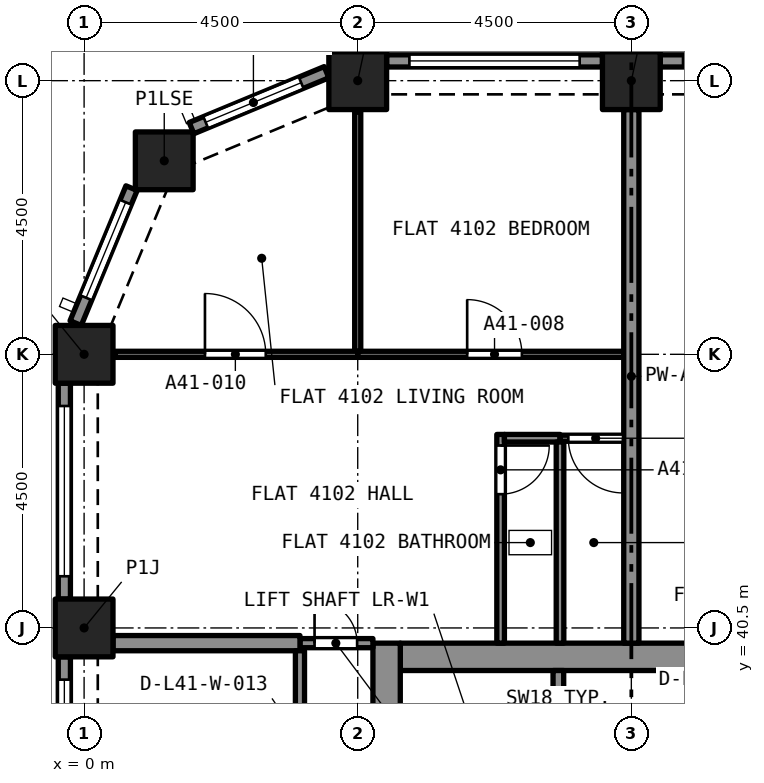
"""IFC4 building model, lengths in metres.
Left out: names, types, materials, properties, quantities, classifications, styles, units other than length and angle.
Written with IfcOpenShell. Run it as: python <this file> out.ifc"""

import sys

from ifc_helpers import new_model, si_unit, direction, frame, frame_2d, origin, origin_2d, place, context, subcontext, project, spatial, rectangle, extrude, element, fill, save


model = new_model("IFC4")
c1 = context("Model", 3, precision=1e-05, world=origin(), true_north=direction((0.0, 1.0)))
c2 = subcontext(c1, "Body", "Model", "MODEL_VIEW")
j1 = project(units=[si_unit("LENGTHUNIT", "METRE"), si_unit("PLANEANGLEUNIT", "RADIAN")], contexts=[c1])
p1 = place(None, origin())
s1 = spatial("IfcSite", under=j1, at=p1, CompositionType="ELEMENT")
p2 = place(p1, origin())
s2 = spatial("IfcBuilding", under=s1, at=p2, CompositionType="ELEMENT")
p3 = place(p2, frame((0.0, 0.0, 146.2)))
s3 = spatial("IfcBuildingStorey", under=s2, at=p3, CompositionType="ELEMENT", Elevation=146.2)
for number, where, z_axis, x_axis in (
    (1, (0.0, 40.5, 0.0), (0.0, 0.0, 1.0), (1.0, 0.0, 0.0)),
    (2, (0.0, 45.0, 0.0), (0.0, 0.0, 1.0), (1.0, 0.0, 0.0)),
    (3, (1.318, 48.182, 0.0), (0.0, 0.0, 1.0), (1.0, 0.0, 0.0)),
    (4, (4.5, 49.5, 0.0), (0.0, 0.0, 1.0), (1.0, 0.0, 0.0)),
    (5, (9.0, 49.5, 0.0), (0.0, 0.0, 1.0), (1.0, 0.0, 0.0)),
):
    element("IfcColumn", number, at=place(p3, frame(where, z_axis=z_axis, x_axis=x_axis)), inside=s3, PredefinedType="COLUMN", context=c2, shape_type="SweptSolid", body=[
        extrude(rectangle(XDim=0.95, YDim=0.95, at=origin_2d()), origin(), (0.0, 0.0, 1.0), 4.4),
    ])
p4 = place(p3, frame((5.2, 40.025, 0.0), z_axis=(0.0, 0.0, 1.0), x_axis=(1.0, 0.0, 0.0)))
e6 = element("IfcWall", 6, at=p4, inside=s3, PredefinedType="SOLIDWALL", context=c2, shape_type="SweptSolid", body=[
    extrude(rectangle(XDim=7.6, YDim=0.45, at=frame_2d((3.8, 0.0))), origin(), (0.0, 0.0, 1.0), 4.4),
])
p5 = place(p3, frame((4.975, 27.25, 0.0), z_axis=(0.0, 0.0, 1.0), x_axis=(0.0, 1.0, 0.0)))
e7 = element("IfcWall", 7, at=p5, inside=s3, PredefinedType="SOLIDWALL", context=c2, shape_type="SweptSolid", body=[
    extrude(rectangle(XDim=13.0, YDim=0.45, at=frame_2d((6.5, 0.0))), origin(), (0.0, 0.0, 1.0), 4.4),
])
p6 = place(p5, frame((8.7, 0.0, 0.0)))
e8 = element("IfcOpeningElement", 8, at=p6, cuts=e7, PredefinedType="OPENING", context=c2, shape_type="SweptSolid", body=[
    extrude(rectangle(XDim=1.2, YDim=2.1, at=frame_2d((0.6, 1.05))), frame((0.0, 0.235, 0.0), z_axis=(0.0, -1.0, 0.0), x_axis=(1.0, 0.0, 0.0)), (0.0, 0.0, 1.0), 0.47),
])
p7 = place(p3, frame((9.475, 49.825, 0.0), z_axis=(0.0, 0.0, 1.0), x_axis=(1.0, 0.0, 0.0)))
e9 = element("IfcWall", 9, at=p7, inside=s3, PredefinedType="SOLIDWALL", context=c2, shape_type="SweptSolid", body=[
    extrude(rectangle(XDim=3.55, YDim=0.2, at=frame_2d((1.775, 0.0))), origin(), (0.0, 0.0, 1.0), 4.4),
])
p8 = place(p7, frame((0.375, 0.0, 0.45)))
e10 = element("IfcOpeningElement", 10, at=p8, cuts=e9, PredefinedType="OPENING", context=c2, shape_type="SweptSolid", body=[
    extrude(rectangle(XDim=2.8, YDim=2.55, at=frame_2d((1.4, 1.275))), frame((0.0, 0.11, 0.0), z_axis=(0.0, -1.0, 0.0), x_axis=(1.0, 0.0, 0.0)), (0.0, 0.0, 1.0), 0.22),
])
p9 = place(p3, frame((4.975, 49.825, 0.0), z_axis=(0.0, 0.0, 1.0), x_axis=(1.0, 0.0, 0.0)))
e11 = element("IfcWall", 11, at=p9, inside=s3, PredefinedType="SOLIDWALL", context=c2, shape_type="SweptSolid", body=[
    extrude(rectangle(XDim=3.55, YDim=0.2, at=frame_2d((1.775, 0.0))), origin(), (0.0, 0.0, 1.0), 4.4),
])
p10 = place(p9, frame((0.375, 0.0, 0.45)))
e12 = element("IfcOpeningElement", 12, at=p10, cuts=e11, PredefinedType="OPENING", context=c2, shape_type="SweptSolid", body=[
    extrude(rectangle(XDim=2.8, YDim=2.55, at=frame_2d((1.4, 1.275))), frame((0.0, 0.11, 0.0), z_axis=(0.0, -1.0, 0.0), x_axis=(1.0, 0.0, 0.0)), (0.0, 0.0, 1.0), 0.22),
])
p11 = place(p3, frame((1.767, 48.72, 0.0), z_axis=(0.0, 0.0, 1.0), x_axis=(0.923880599843, 0.382680855588, 0.0)))
e13 = element("IfcWall", 13, at=p11, inside=s3, PredefinedType="SOLIDWALL", context=c2, shape_type="SweptSolid", body=[
    extrude(rectangle(XDim=2.403, YDim=0.2, at=frame_2d((1.201, 0.0))), origin(), (0.0, 0.0, 1.0), 4.4),
])
p12 = place(p11, frame((0.251, 0.0, 0.45)))
e14 = element("IfcOpeningElement", 14, at=p12, cuts=e13, PredefinedType="OPENING", context=c2, shape_type="SweptSolid", body=[
    extrude(rectangle(XDim=1.7, YDim=2.55, at=frame_2d((0.85, 1.275))), frame((0.0, 0.11, 0.0), z_axis=(0.0, -1.0, 0.0), x_axis=(1.0, 0.0, 0.0)), (0.0, 0.0, 1.0), 0.22),
])
p13 = place(p3, frame((-0.139, 45.513, 0.0), z_axis=(0.0, 0.0, 1.0), x_axis=(0.382680855588, 0.923880599843, 0.0)))
e15 = element("IfcWall", 15, at=p13, inside=s3, PredefinedType="SOLIDWALL", context=c2, shape_type="SweptSolid", body=[
    extrude(rectangle(XDim=2.403, YDim=0.2, at=frame_2d((1.201, 0.0))), origin(), (0.0, 0.0, 1.0), 4.4),
])
p14 = place(p13, frame((0.451, 0.0, 0.45)))
e16 = element("IfcOpeningElement", 16, at=p14, cuts=e15, PredefinedType="OPENING", context=c2, shape_type="SweptSolid", body=[
    extrude(rectangle(XDim=1.7, YDim=2.55, at=frame_2d((0.85, 1.275))), frame((0.0, 0.11, 0.0), z_axis=(0.0, -1.0, 0.0), x_axis=(1.0, 0.0, 0.0)), (0.0, 0.0, 1.0), 0.22),
])
p15 = place(p3, frame((-0.325, 40.975, 0.0), z_axis=(0.0, 0.0, 1.0), x_axis=(0.0, 1.0, 0.0)))
e17 = element("IfcWall", 17, at=p15, inside=s3, PredefinedType="SOLIDWALL", context=c2, shape_type="SweptSolid", body=[
    extrude(rectangle(XDim=3.55, YDim=0.2, at=frame_2d((1.775, 0.0))), origin(), (0.0, 0.0, 1.0), 4.4),
])
p16 = place(p15, frame((0.375, 0.0, 0.45)))
e18 = element("IfcOpeningElement", 18, at=p16, cuts=e17, PredefinedType="OPENING", context=c2, shape_type="SweptSolid", body=[
    extrude(rectangle(XDim=2.8, YDim=2.55, at=frame_2d((1.4, 1.275))), frame((0.0, 0.11, 0.0), z_axis=(0.0, -1.0, 0.0), x_axis=(1.0, 0.0, 0.0)), (0.0, 0.0, 1.0), 0.22),
])
p17 = place(p3, frame((-0.325, 36.475, 0.0), z_axis=(0.0, 0.0, 1.0), x_axis=(0.0, 1.0, 0.0)))
e19 = element("IfcWall", 19, at=p17, inside=s3, PredefinedType="SOLIDWALL", context=c2, shape_type="SweptSolid", body=[
    extrude(rectangle(XDim=3.55, YDim=0.2, at=frame_2d((1.775, 0.0))), origin(), (0.0, 0.0, 1.0), 4.4),
])
p18 = place(p17, frame((0.375, 0.0, 0.45)))
e20 = element("IfcOpeningElement", 20, at=p18, cuts=e19, PredefinedType="OPENING", context=c2, shape_type="SweptSolid", body=[
    extrude(rectangle(XDim=2.8, YDim=2.55, at=frame_2d((1.4, 1.275))), frame((0.0, 0.11, 0.0), z_axis=(0.0, -1.0, 0.0), x_axis=(1.0, 0.0, 0.0)), (0.0, 0.0, 1.0), 0.22),
])
p19 = place(p3, frame((6.85, 43.683, 0.0), z_axis=(0.0, 0.0, 1.0), x_axis=(0.0, -1.0, 0.0)))
e21 = element("IfcWall", 21, at=p19, inside=s3, PredefinedType="PARTITIONING", context=c2, shape_type="SweptSolid", body=[
    extrude(rectangle(XDim=3.433, YDim=0.125, at=frame_2d((1.716, 0.0))), origin(), (0.0, 0.0, 1.0), 4.1),
])
p20 = place(p19, frame((0.183, 0.0, 0.0)))
e22 = element("IfcOpeningElement", 22, at=p20, cuts=e21, PredefinedType="OPENING", context=c2, shape_type="SweptSolid", body=[
    extrude(rectangle(XDim=0.8, YDim=2.1, at=frame_2d((0.4, 1.05))), frame((0.0, 0.073, 0.0), z_axis=(0.0, -1.0, 0.0), x_axis=(1.0, 0.0, 0.0)), (0.0, 0.0, 1.0), 0.145),
])
p21 = place(p3, frame((6.913, 43.62, 0.0), z_axis=(0.0, 0.0, 1.0), x_axis=(1.0, 0.0, 0.0)))
e23 = element("IfcWall", 23, at=p21, inside=s3, PredefinedType="PARTITIONING", context=c2, shape_type="SweptSolid", body=[
    extrude(rectangle(XDim=0.915, YDim=0.125, at=frame_2d((0.458, 0.0))), origin(), (0.0, 0.0, 1.0), 4.1),
])
p22 = place(p3, frame((7.827, 40.25, 0.0), z_axis=(0.0, 0.0, 1.0), x_axis=(0.0, 1.0, 0.0)))
e24 = element("IfcWall", 24, at=p22, inside=s3, PredefinedType="PARTITIONING", context=c2, shape_type="SweptSolid", body=[
    extrude(rectangle(XDim=3.308, YDim=0.125, at=frame_2d((1.654, 0.0))), origin(), (0.0, 0.0, 1.0), 4.1),
])
p23 = place(p3, frame((4.5, 45.0, 0.0), z_axis=(0.0, 0.0, 1.0), x_axis=(1.0, 0.0, 0.0)))
e25 = element("IfcWall", 25, at=p23, inside=s3, PredefinedType="PARTITIONING", context=c2, shape_type="SweptSolid", body=[
    extrude(rectangle(XDim=4.375, YDim=0.1, at=frame_2d((2.188, 0.0))), origin(), (0.0, 0.0, 1.0), 4.1),
])
p24 = place(p23, frame((1.8, 0.0, 0.0)))
e26 = element("IfcOpeningElement", 26, at=p24, cuts=e25, PredefinedType="OPENING", context=c2, shape_type="SweptSolid", body=[
    extrude(rectangle(XDim=0.9, YDim=2.1, at=frame_2d((0.45, 1.05))), frame((0.0, 0.06, 0.0), z_axis=(0.0, -1.0, 0.0), x_axis=(1.0, 0.0, 0.0)), (0.0, 0.0, 1.0), 0.12),
])
p25 = place(p3, frame((4.5, 45.05, 0.0), z_axis=(0.0, 0.0, 1.0), x_axis=(0.0, 1.0, 0.0)))
e27 = element("IfcWall", 27, at=p25, inside=s3, PredefinedType="PARTITIONING", context=c2, shape_type="SweptSolid", body=[
    extrude(rectangle(XDim=3.936, YDim=0.1, at=frame_2d((1.968, 0.0))), origin(), (0.0, 0.0, 1.0), 4.1),
])
p26 = place(p3, frame((8.875, 43.62, 0.0), z_axis=(0.0, 0.0, 1.0), x_axis=(-1.0, 0.0, 0.0)))
e28 = element("IfcWall", 28, at=p26, inside=s3, PredefinedType="PARTITIONING", context=c2, shape_type="SweptSolid", body=[
    extrude(rectangle(XDim=1.048, YDim=0.1, at=frame_2d((0.524, 0.0))), origin(), (0.0, 0.0, 1.0), 4.1),
])
p27 = place(p26, frame((0.011, 0.0, 0.0)))
e29 = element("IfcOpeningElement", 29, at=p27, cuts=e28, PredefinedType="OPENING", context=c2, shape_type="SweptSolid", body=[
    extrude(rectangle(XDim=0.9, YDim=2.1, at=frame_2d((0.45, 1.05))), frame((0.0, 0.06, 0.0), z_axis=(0.0, -1.0, 0.0), x_axis=(1.0, 0.0, 0.0)), (0.0, 0.0, 1.0), 0.12),
])
p28 = place(p3, frame((0.514, 45.0, 0.0), z_axis=(0.0, 0.0, 1.0), x_axis=(1.0, 0.0, 0.0)))
e30 = element("IfcWall", 30, at=p28, inside=s3, PredefinedType="PARTITIONING", context=c2, shape_type="SweptSolid", body=[
    extrude(rectangle(XDim=3.986, YDim=0.1, at=frame_2d((1.993, 0.0))), origin(), (0.0, 0.0, 1.0), 4.1),
])
p29 = place(p28, frame((1.473, 0.0, 0.0)))
e31 = element("IfcOpeningElement", 31, at=p29, cuts=e30, PredefinedType="OPENING", context=c2, shape_type="SweptSolid", body=[
    extrude(rectangle(XDim=1.0, YDim=2.1, at=frame_2d((0.5, 1.05))), frame((0.0, 0.06, 0.0), z_axis=(0.0, -1.0, 0.0), x_axis=(1.0, 0.0, 0.0)), (0.0, 0.0, 1.0), 0.12),
])
p30 = place(p3, frame((3.55, 40.25, 0.0), z_axis=(0.0, 0.0, 1.0), x_axis=(1.0, 0.0, 0.0)))
e32 = element("IfcWall", 32, at=p30, inside=s3, PredefinedType="PARTITIONING", context=c2, shape_type="SweptSolid", body=[
    extrude(rectangle(XDim=1.2, YDim=0.15, at=frame_2d((0.6, 0.0))), origin(), (0.0, 0.0, 1.0), 4.1),
])
p31 = place(p30, frame((0.24, 0.0, 0.0)))
e33 = element("IfcOpeningElement", 33, at=p31, cuts=e32, PredefinedType="OPENING", context=c2, shape_type="SweptSolid", body=[
    extrude(rectangle(XDim=0.7, YDim=2.1, at=frame_2d((0.35, 1.05))), frame((0.0, 0.085, 0.0), z_axis=(0.0, -1.0, 0.0), x_axis=(1.0, 0.0, 0.0)), (0.0, 0.0, 1.0), 0.17),
])
p32 = place(p3, frame((0.475, 40.25, 0.0), z_axis=(0.0, 0.0, 1.0), x_axis=(1.0, 0.0, 0.0)))
e34 = element("IfcWall", 34, at=p32, inside=s3, PredefinedType="PARTITIONING", context=c2, shape_type="SweptSolid", body=[
    extrude(rectangle(XDim=3.075, YDim=0.25, at=frame_2d((1.538, 0.0))), origin(), (0.0, 0.0, 1.0), 4.1),
])
p33 = place(p3, frame((9.0, 40.25, 0.0), z_axis=(0.0, 0.0, 1.0), x_axis=(0.0, 1.0, 0.0)))
e35 = element("IfcWall", 35, at=p33, inside=s3, PredefinedType="PARTITIONING", context=c2, shape_type="SweptSolid", body=[
    extrude(rectangle(XDim=8.775, YDim=0.25, at=frame_2d((4.387, 0.0))), origin(), (0.0, 0.0, 1.0), 4.1),
])
p34 = place(p3, frame((3.55, 31.5, 0.0), z_axis=(0.0, 0.0, 1.0), x_axis=(0.0, 1.0, 0.0)))
e36 = element("IfcWall", 36, at=p34, inside=s3, PredefinedType="PARTITIONING", context=c2, shape_type="SweptSolid", body=[
    extrude(rectangle(XDim=8.625, YDim=0.15, at=frame_2d((4.312, 0.0))), origin(), (0.0, 0.0, 1.0), 4.1),
])
p35 = place(p34, frame((3.875, 0.0, 0.0)))
e37 = element("IfcOpeningElement", 37, at=p35, cuts=e36, PredefinedType="OPENING", context=c2, shape_type="SweptSolid", body=[
    extrude(rectangle(XDim=1.0, YDim=2.1, at=frame_2d((0.5, 1.05))), frame((0.0, 0.085, 0.0), z_axis=(0.0, -1.0, 0.0), x_axis=(1.0, 0.0, 0.0)), (0.0, 0.0, 1.0), 0.17),
])
p36 = place(p3, frame((7.8, 37.5, 0.0), z_axis=(0.0, 0.0, 1.0), x_axis=(0.0, 1.0, 0.0)))
e38 = element("IfcWall", 38, at=p36, inside=s3, PredefinedType="SOLIDWALL", context=c2, shape_type="SweptSolid", body=[
    extrude(rectangle(XDim=2.3, YDim=0.175, at=frame_2d((1.15, 0.0))), origin(), (0.0, 0.0, 1.0), 4.1),
])
p37 = place(p8, origin())
e39 = element("IfcWindow", 39, at=p37, inside=s3, PartitioningType="SINGLE_PANEL", PredefinedType="WINDOW", context=c2, shape_type="SweptSolid", body=[
    extrude(rectangle(XDim=2.8, YDim=2.55, at=frame_2d((1.4, 1.275))), frame((0.0, 0.03, 0.0), z_axis=(0.0, -1.0, 0.0), x_axis=(1.0, 0.0, 0.0)), (0.0, 0.0, 1.0), 0.06),
])
fill(e10, e39)
p38 = place(p10, origin())
e40 = element("IfcWindow", 40, at=p38, inside=s3, PartitioningType="SINGLE_PANEL", PredefinedType="WINDOW", context=c2, shape_type="SweptSolid", body=[
    extrude(rectangle(XDim=2.8, YDim=2.55, at=frame_2d((1.4, 1.275))), frame((0.0, 0.03, 0.0), z_axis=(0.0, -1.0, 0.0), x_axis=(1.0, 0.0, 0.0)), (0.0, 0.0, 1.0), 0.06),
])
fill(e12, e40)
p39 = place(p12, origin())
e41 = element("IfcWindow", 41, at=p39, inside=s3, PartitioningType="SINGLE_PANEL", PredefinedType="WINDOW", context=c2, shape_type="SweptSolid", body=[
    extrude(rectangle(XDim=1.7, YDim=2.55, at=frame_2d((0.85, 1.275))), frame((0.0, 0.03, 0.0), z_axis=(0.0, -1.0, 0.0), x_axis=(1.0, 0.0, 0.0)), (0.0, 0.0, 1.0), 0.06),
])
fill(e14, e41)
p40 = place(p14, origin())
e42 = element("IfcWindow", 42, at=p40, inside=s3, PartitioningType="SINGLE_PANEL", PredefinedType="WINDOW", context=c2, shape_type="SweptSolid", body=[
    extrude(rectangle(XDim=1.7, YDim=2.55, at=frame_2d((0.85, 1.275))), frame((0.0, 0.03, 0.0), z_axis=(0.0, -1.0, 0.0), x_axis=(1.0, 0.0, 0.0)), (0.0, 0.0, 1.0), 0.06),
])
fill(e16, e42)
p41 = place(p16, origin())
e43 = element("IfcWindow", 43, at=p41, inside=s3, PartitioningType="SINGLE_PANEL", PredefinedType="WINDOW", context=c2, shape_type="SweptSolid", body=[
    extrude(rectangle(XDim=2.8, YDim=2.55, at=frame_2d((1.4, 1.275))), frame((0.0, 0.03, 0.0), z_axis=(0.0, -1.0, 0.0), x_axis=(1.0, 0.0, 0.0)), (0.0, 0.0, 1.0), 0.06),
])
fill(e18, e43)
p42 = place(p18, origin())
e44 = element("IfcWindow", 44, at=p42, inside=s3, PartitioningType="SINGLE_PANEL", PredefinedType="WINDOW", context=c2, shape_type="SweptSolid", body=[
    extrude(rectangle(XDim=2.8, YDim=2.55, at=frame_2d((1.4, 1.275))), frame((0.0, 0.03, 0.0), z_axis=(0.0, -1.0, 0.0), x_axis=(1.0, 0.0, 0.0)), (0.0, 0.0, 1.0), 0.06),
])
fill(e20, e44)
p43 = place(p20, origin())
e45 = element("IfcDoor", 45, at=p43, inside=s3, OperationType="SINGLE_SWING_LEFT", PredefinedType="DOOR", context=c2, shape_type="SweptSolid", body=[
    extrude(rectangle(XDim=0.8, YDim=2.1, at=frame_2d((0.4, 1.05))), frame((0.0, 0.025, 0.0), z_axis=(0.0, -1.0, 0.0), x_axis=(1.0, 0.0, 0.0)), (0.0, 0.0, 1.0), 0.05),
])
fill(e22, e45)
p44 = place(p24, origin())
e46 = element("IfcDoor", 46, at=p44, inside=s3, OperationType="SINGLE_SWING_RIGHT", PredefinedType="DOOR", context=c2, shape_type="SweptSolid", body=[
    extrude(rectangle(XDim=0.9, YDim=2.1, at=frame_2d((0.45, 1.05))), frame((0.0, 0.025, 0.0), z_axis=(0.0, -1.0, 0.0), x_axis=(1.0, 0.0, 0.0)), (0.0, 0.0, 1.0), 0.05),
])
fill(e26, e46)
p45 = place(p27, origin())
e47 = element("IfcDoor", 47, at=p45, inside=s3, OperationType="SINGLE_SWING_LEFT", PredefinedType="DOOR", context=c2, shape_type="SweptSolid", body=[
    extrude(rectangle(XDim=0.9, YDim=2.1, at=frame_2d((0.45, 1.05))), frame((0.0, 0.025, 0.0), z_axis=(0.0, -1.0, 0.0), x_axis=(1.0, 0.0, 0.0)), (0.0, 0.0, 1.0), 0.05),
])
fill(e29, e47)
p46 = place(p29, origin())
e48 = element("IfcDoor", 48, at=p46, inside=s3, OperationType="SINGLE_SWING_LEFT", PredefinedType="DOOR", context=c2, shape_type="SweptSolid", body=[
    extrude(rectangle(XDim=1.0, YDim=2.1, at=frame_2d((0.5, 1.05))), frame((0.0, 0.025, 0.0), z_axis=(0.0, -1.0, 0.0), x_axis=(1.0, 0.0, 0.0)), (0.0, 0.0, 1.0), 0.05),
])
fill(e31, e48)
p47 = place(p31, origin())
e49 = element("IfcDoor", 49, at=p47, inside=s3, OperationType="SINGLE_SWING_LEFT", PredefinedType="DOOR", context=c2, shape_type="SweptSolid", body=[
    extrude(rectangle(XDim=0.7, YDim=2.1, at=frame_2d((0.35, 1.05))), frame((0.0, 0.025, 0.0), z_axis=(0.0, -1.0, 0.0), x_axis=(1.0, 0.0, 0.0)), (0.0, 0.0, 1.0), 0.05),
])
fill(e33, e49)
save(model, sys.argv[1])
